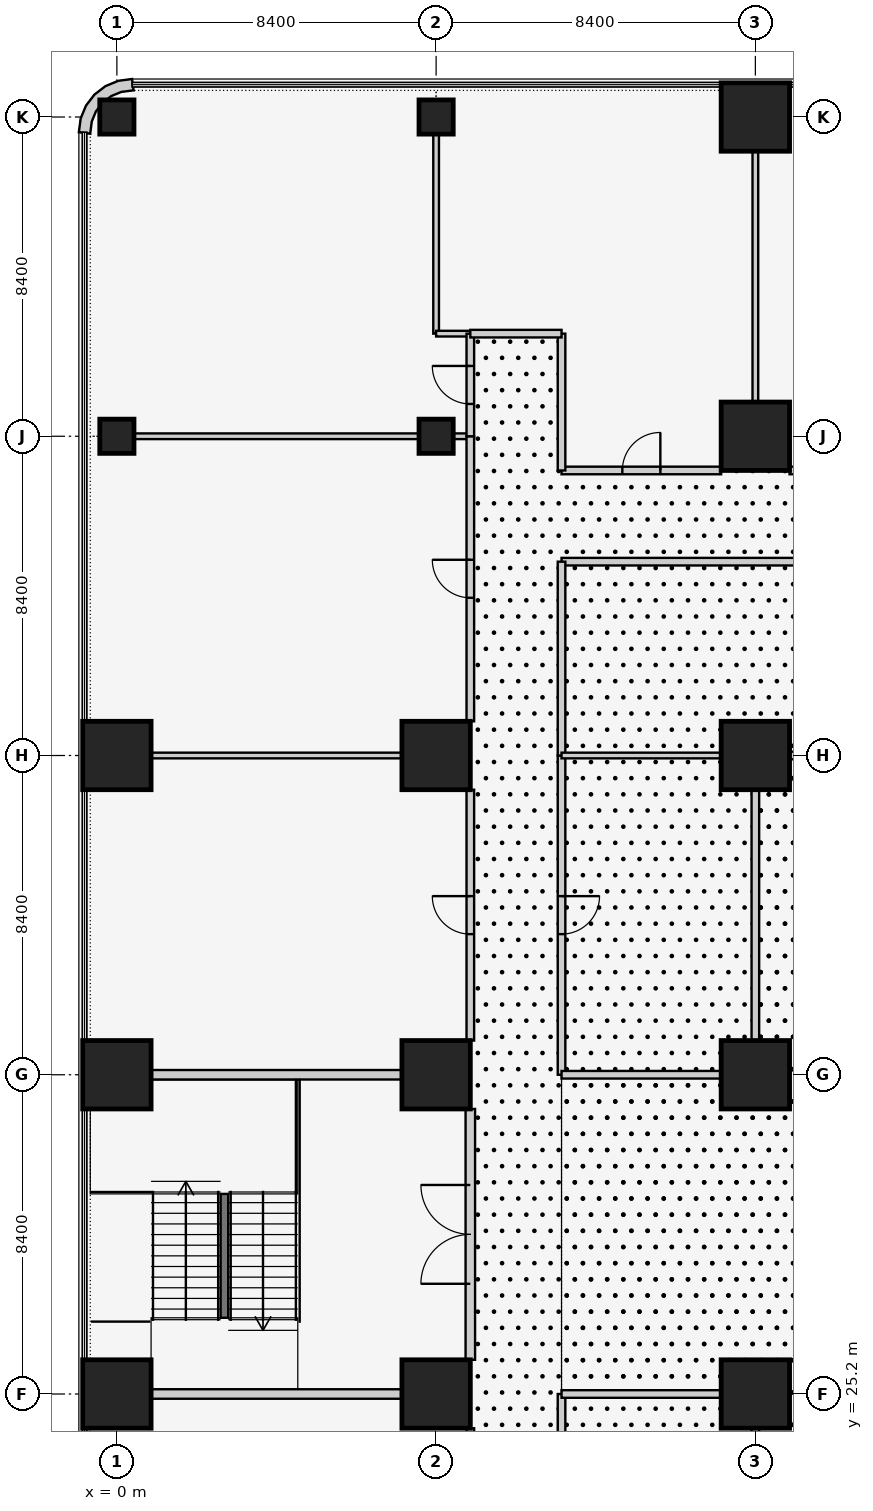
"""IFC4 building model, lengths in metres.
Left out: names, types, materials, properties, quantities, classifications, styles, units other than length and angle.
Written with IfcOpenShell. Run it as: python <this file> out.ifc"""

import sys

from ifc_helpers import new_model, si_unit, direction, frame, frame_2d, origin, origin_2d, place, context, subcontext, project, spatial, polyline, rectangle, outline, extrude, element, fill, save


model = new_model("IFC4")
c1 = context("Model", 3, precision=1e-05, world=origin(), true_north=direction((0.0, 1.0)))
c2 = subcontext(c1, "Body", "Model", "MODEL_VIEW")
j1 = project(units=[si_unit("LENGTHUNIT", "METRE"), si_unit("PLANEANGLEUNIT", "RADIAN")], contexts=[c1])
p1 = place(None, origin())
s1 = spatial("IfcSite", under=j1, at=p1, CompositionType="ELEMENT")
p2 = place(p1, origin())
s2 = spatial("IfcBuilding", under=s1, at=p2, CompositionType="ELEMENT")
p3 = place(p2, frame((0.0, 0.0, 6.0)))
s3 = spatial("IfcBuildingStorey", under=s2, at=p3, CompositionType="ELEMENT", Elevation=6.0)
for number, where, z_axis, x_axis in (
    (1, (0.0, 25.2, 0.0), (0.0, 0.0, 1.0), (1.0, 0.0, 0.0)),
    (2, (0.0, 33.6, 0.0), (0.0, 0.0, 1.0), (1.0, 0.0, 0.0)),
    (3, (0.0, 42.0, 0.0), (0.0, 0.0, 1.0), (1.0, 0.0, 0.0)),
):
    element("IfcColumn", number, at=place(p3, frame(where, z_axis=z_axis, x_axis=x_axis)), inside=s3, PredefinedType="COLUMN", context=c2, shape_type="SweptSolid", body=[
        extrude(rectangle(XDim=1.8, YDim=1.8, at=origin_2d()), origin(), (0.0, 0.0, 1.0), 4.5),
    ])
for number, where, z_axis, x_axis in (
    (4, (0.0, 50.4, 0.0), (0.0, 0.0, 1.0), (1.0, 0.0, 0.0)),
    (5, (0.0, 58.8, 0.0), (0.0, 0.0, 1.0), (1.0, 0.0, 0.0)),
):
    element("IfcColumn", number, at=place(p3, frame(where, z_axis=z_axis, x_axis=x_axis)), inside=s3, PredefinedType="COLUMN", context=c2, shape_type="SweptSolid", body=[
        extrude(rectangle(XDim=0.9, YDim=0.9, at=origin_2d()), origin(), (0.0, 0.0, 1.0), 4.5),
    ])
for number, where, z_axis, x_axis in (
    (6, (8.4, 25.2, 0.0), (0.0, 0.0, 1.0), (1.0, 0.0, 0.0)),
    (7, (8.4, 33.6, 0.0), (0.0, 0.0, 1.0), (1.0, 0.0, 0.0)),
    (8, (8.4, 42.0, 0.0), (0.0, 0.0, 1.0), (1.0, 0.0, 0.0)),
):
    element("IfcColumn", number, at=place(p3, frame(where, z_axis=z_axis, x_axis=x_axis)), inside=s3, PredefinedType="COLUMN", context=c2, shape_type="SweptSolid", body=[
        extrude(rectangle(XDim=1.8, YDim=1.8, at=origin_2d()), origin(), (0.0, 0.0, 1.0), 4.5),
    ])
for number, where, z_axis, x_axis in (
    (9, (8.4, 50.4, 0.0), (0.0, 0.0, 1.0), (1.0, 0.0, 0.0)),
    (10, (8.4, 58.8, 0.0), (0.0, 0.0, 1.0), (1.0, 0.0, 0.0)),
):
    element("IfcColumn", number, at=place(p3, frame(where, z_axis=z_axis, x_axis=x_axis)), inside=s3, PredefinedType="COLUMN", context=c2, shape_type="SweptSolid", body=[
        extrude(rectangle(XDim=0.9, YDim=0.9, at=origin_2d()), origin(), (0.0, 0.0, 1.0), 4.5),
    ])
for number, where, z_axis, x_axis in (
    (11, (16.8, 25.2, 0.0), (0.0, 0.0, 1.0), (1.0, 0.0, 0.0)),
    (12, (16.8, 33.6, 0.0), (0.0, 0.0, 1.0), (1.0, 0.0, 0.0)),
    (13, (16.8, 42.0, 0.0), (0.0, 0.0, 1.0), (1.0, 0.0, 0.0)),
    (14, (16.8, 50.4, 0.0), (0.0, 0.0, 1.0), (1.0, 0.0, 0.0)),
    (15, (16.8, 58.8, 0.0), (0.0, 0.0, 1.0), (1.0, 0.0, 0.0)),
):
    element("IfcColumn", number, at=place(p3, frame(where, z_axis=z_axis, x_axis=x_axis)), inside=s3, PredefinedType="COLUMN", context=c2, shape_type="SweptSolid", body=[
        extrude(rectangle(XDim=1.8, YDim=1.8, at=origin_2d()), origin(), (0.0, 0.0, 1.0), 4.5),
    ])
p4 = place(p3, frame((0.445, 59.648, 0.0), z_axis=(0.0, 0.0, 1.0), x_axis=(-0.707106781187, 0.707106781187, 0.0)))
e16 = element("IfcWall", 16, at=p4, inside=s3, PredefinedType="SOLIDWALL", context=c2, shape_type="SweptSolid", body=[
    extrude(outline(polyline([(0.139, 1.904), (-0.101, 1.72), (-0.087, 1.706), (0.1, 1.463), (0.209, 1.198), (0.247, 0.914), (0.209, 0.63), (0.1, 0.365), (-0.087, 0.122), (-0.101, 0.108), (0.139, -0.076), (0.362, 0.214), (0.502, 0.552), (0.549, 0.914), (0.502, 1.276), (0.362, 1.614), (0.139, 1.904)])), origin(), (0.0, 0.0, 1.0), 4.3),
])
for number, where, z_axis, x_axis in (
    (17, (7.5, 25.2, 0.0), (0.0, 0.0, 1.0), (-1.0, 0.0, 0.0)),
    (18, (0.9, 33.6, 0.0), (0.0, 0.0, 1.0), (1.0, 0.0, 0.0)),
):
    element("IfcWall", number, at=place(p3, frame(where, z_axis=z_axis, x_axis=x_axis)), inside=s3, PredefinedType="SOLIDWALL", context=c2, shape_type="SweptSolid", body=[
        extrude(rectangle(XDim=6.6, YDim=0.25, at=frame_2d((3.3, 0.0))), origin(), (0.0, 0.0, 1.0), 3.543),
    ])
p5 = place(p3, frame((9.3, 32.7, 0.0), z_axis=(0.0, 0.0, 1.0), x_axis=(0.0, -1.0, 0.0)))
e19 = element("IfcWall", 19, at=p5, inside=s3, PredefinedType="SOLIDWALL", context=c2, shape_type="SweptSolid", body=[
    extrude(rectangle(XDim=6.6, YDim=0.25, at=frame_2d((3.3, 0.0))), origin(), (0.0, 0.0, 1.0), 4.3),
])
p6 = place(p5, frame((2.0, 0.0, 0.0)))
e20 = element("IfcOpeningElement", 20, at=p6, cuts=e19, PredefinedType="OPENING", context=c2, shape_type="SweptSolid", body=[
    extrude(rectangle(XDim=2.6, YDim=2.4, at=frame_2d((1.3, 1.2))), frame((0.0, 0.135, 0.0), z_axis=(0.0, -1.0, 0.0), x_axis=(1.0, 0.0, 0.0)), (0.0, 0.0, 1.0), 0.27),
])
p7 = place(p3, frame((9.3, 24.3, 0.0), z_axis=(0.0, 0.0, 1.0), x_axis=(0.0, -1.0, 0.0)))
e21 = element("IfcWall", 21, at=p7, inside=s3, PredefinedType="PARTITIONING", context=c2, shape_type="SweptSolid", body=[
    extrude(rectangle(XDim=6.6, YDim=0.2, at=frame_2d((3.3, 0.0))), origin(), (0.0, 0.0, 1.0), 4.3),
])
p8 = place(p7, frame((2.8, 0.0, 0.0)))
e22 = element("IfcOpeningElement", 22, at=p8, cuts=e21, PredefinedType="OPENING", context=c2, shape_type="SweptSolid", body=[
    extrude(rectangle(XDim=1.0, YDim=2.1, at=frame_2d((0.5, 1.05))), frame((0.0, 0.11, 0.0), z_axis=(0.0, -1.0, 0.0), x_axis=(1.0, 0.0, 0.0)), (0.0, 0.0, 1.0), 0.22),
])
p9 = place(p3, frame((0.9, 42.0, 0.0), z_axis=(0.0, 0.0, 1.0), x_axis=(1.0, 0.0, 0.0)))
e23 = element("IfcWall", 23, at=p9, inside=s3, PredefinedType="PARTITIONING", context=c2, shape_type="SweptSolid", body=[
    extrude(rectangle(XDim=6.6, YDim=0.15, at=frame_2d((3.3, 0.0))), origin(), (0.0, 0.0, 1.0), 3.543),
])
p10 = place(p3, frame((9.3, 41.1, 0.0), z_axis=(0.0, 0.0, 1.0), x_axis=(0.0, -1.0, 0.0)))
e24 = element("IfcWall", 24, at=p10, inside=s3, PredefinedType="PARTITIONING", context=c2, shape_type="SweptSolid", body=[
    extrude(rectangle(XDim=6.6, YDim=0.2, at=frame_2d((3.3, 0.0))), origin(), (0.0, 0.0, 1.0), 4.3),
])
p11 = place(p10, frame((2.8, 0.0, 0.0)))
e25 = element("IfcOpeningElement", 25, at=p11, cuts=e24, PredefinedType="OPENING", context=c2, shape_type="SweptSolid", body=[
    extrude(rectangle(XDim=1.0, YDim=2.1, at=frame_2d((0.5, 1.05))), frame((0.0, 0.11, 0.0), z_axis=(0.0, -1.0, 0.0), x_axis=(1.0, 0.0, 0.0)), (0.0, 0.0, 1.0), 0.22),
])
p12 = place(p3, frame((0.45, 50.4, 0.0), z_axis=(0.0, 0.0, 1.0), x_axis=(1.0, 0.0, 0.0)))
e26 = element("IfcWall", 26, at=p12, inside=s3, PredefinedType="PARTITIONING", context=c2, shape_type="SweptSolid", body=[
    extrude(rectangle(XDim=7.5, YDim=0.15, at=frame_2d((3.75, 0.0))), origin(), (0.0, 0.0, 1.0), 3.543),
])
p13 = place(p3, frame((8.85, 50.4, 0.0), z_axis=(0.0, 0.0, 1.0), x_axis=(1.0, 0.0, 0.0)))
e27 = element("IfcWall", 27, at=p13, inside=s3, PredefinedType="PARTITIONING", context=c2, shape_type="SweptSolid", body=[
    extrude(rectangle(XDim=0.45, YDim=0.15, at=frame_2d((0.225, 0.0))), origin(), (0.0, 0.0, 1.0), 3.543),
])
p14 = place(p3, frame((9.3, 50.4, 0.0), z_axis=(0.0, 0.0, 1.0), x_axis=(0.0, -1.0, 0.0)))
e28 = element("IfcWall", 28, at=p14, inside=s3, PredefinedType="PARTITIONING", context=c2, shape_type="SweptSolid", body=[
    extrude(rectangle(XDim=7.5, YDim=0.2, at=frame_2d((3.75, 0.0))), origin(), (0.0, 0.0, 1.0), 4.3),
])
p15 = place(p14, frame((3.25, 0.0, 0.0)))
e29 = element("IfcOpeningElement", 29, at=p15, cuts=e28, PredefinedType="OPENING", context=c2, shape_type="SweptSolid", body=[
    extrude(rectangle(XDim=1.0, YDim=2.1, at=frame_2d((0.5, 1.05))), frame((0.0, 0.11, 0.0), z_axis=(0.0, -1.0, 0.0), x_axis=(1.0, 0.0, 0.0)), (0.0, 0.0, 1.0), 0.22),
])
p16 = place(p3, frame((16.8, 51.3, 0.0), z_axis=(0.0, 0.0, 1.0), x_axis=(0.0, 1.0, 0.0)))
e30 = element("IfcWall", 30, at=p16, inside=s3, PredefinedType="PARTITIONING", context=c2, shape_type="SweptSolid", body=[
    extrude(rectangle(XDim=6.6, YDim=0.15, at=frame_2d((3.3, 0.0))), origin(), (0.0, 0.0, 1.0), 3.543),
])
p17 = place(p3, frame((24.3, 49.5, 0.0), z_axis=(0.0, 0.0, 1.0), x_axis=(-1.0, 0.0, 0.0)))
e31 = element("IfcWall", 31, at=p17, inside=s3, PredefinedType="PARTITIONING", context=c2, shape_type="SweptSolid", body=[
    extrude(rectangle(XDim=6.6, YDim=0.2, at=frame_2d((3.3, 0.0))), origin(), (0.0, 0.0, 1.0), 4.3),
])
p18 = place(p17, frame((2.8, 0.0, 0.0)))
e32 = element("IfcOpeningElement", 32, at=p18, cuts=e31, PredefinedType="OPENING", context=c2, shape_type="SweptSolid", body=[
    extrude(rectangle(XDim=1.0, YDim=2.1, at=frame_2d((0.5, 1.05))), frame((0.0, 0.11, 0.0), z_axis=(0.0, -1.0, 0.0), x_axis=(1.0, 0.0, 0.0)), (0.0, 0.0, 1.0), 0.22),
])
p19 = place(p3, frame((8.4, 58.35, 0.0), z_axis=(0.0, 0.0, 1.0), x_axis=(0.0, -1.0, 0.0)))
e33 = element("IfcWall", 33, at=p19, inside=s3, PredefinedType="PARTITIONING", context=c2, shape_type="SweptSolid", body=[
    extrude(rectangle(XDim=5.25, YDim=0.15, at=frame_2d((2.625, 0.0))), origin(), (0.0, 0.0, 1.0), 3.543),
])
p20 = place(p3, frame((8.4, 53.1, 0.0), z_axis=(0.0, 0.0, 1.0), x_axis=(1.0, 0.0, 0.0)))
e34 = element("IfcWall", 34, at=p20, inside=s3, PredefinedType="PARTITIONING", context=c2, shape_type="SweptSolid", body=[
    extrude(rectangle(XDim=0.9, YDim=0.15, at=frame_2d((0.45, 0.0))), origin(), (0.0, 0.0, 1.0), 4.3),
])
p21 = place(p3, frame((9.3, 53.1, 0.0), z_axis=(0.0, 0.0, 1.0), x_axis=(0.0, -1.0, 0.0)))
e35 = element("IfcWall", 35, at=p21, inside=s3, PredefinedType="PARTITIONING", context=c2, shape_type="SweptSolid", body=[
    extrude(rectangle(XDim=2.7, YDim=0.2, at=frame_2d((1.35, 0.0))), origin(), (0.0, 0.0, 1.0), 4.3),
])
p22 = place(p21, frame((0.85, 0.0, 0.0)))
e36 = element("IfcOpeningElement", 36, at=p22, cuts=e35, PredefinedType="OPENING", context=c2, shape_type="SweptSolid", body=[
    extrude(rectangle(XDim=1.0, YDim=2.1, at=frame_2d((0.5, 1.05))), frame((0.0, 0.11, 0.0), z_axis=(0.0, -1.0, 0.0), x_axis=(1.0, 0.0, 0.0)), (0.0, 0.0, 1.0), 0.22),
])
p23 = place(p3, frame((15.9, 49.5, 0.0), z_axis=(0.0, 0.0, 1.0), x_axis=(-1.0, 0.0, 0.0)))
e37 = element("IfcWall", 37, at=p23, inside=s3, PredefinedType="PARTITIONING", context=c2, shape_type="SweptSolid", body=[
    extrude(rectangle(XDim=4.2, YDim=0.2, at=frame_2d((2.1, 0.0))), origin(), (0.0, 0.0, 1.0), 4.3),
])
p24 = place(p23, frame((1.6, 0.0, 0.0)))
e38 = element("IfcOpeningElement", 38, at=p24, cuts=e37, PredefinedType="OPENING", context=c2, shape_type="SweptSolid", body=[
    extrude(rectangle(XDim=1.0, YDim=2.1, at=frame_2d((0.5, 1.05))), frame((0.0, 0.11, 0.0), z_axis=(0.0, -1.0, 0.0), x_axis=(1.0, 0.0, 0.0)), (0.0, 0.0, 1.0), 0.22),
])
p25 = place(p3, frame((11.7, 49.5, 0.0), z_axis=(0.0, 0.0, 1.0), x_axis=(0.0, 1.0, 0.0)))
e39 = element("IfcWall", 39, at=p25, inside=s3, PredefinedType="PARTITIONING", context=c2, shape_type="SweptSolid", body=[
    extrude(rectangle(XDim=3.6, YDim=0.2, at=frame_2d((1.8, 0.0))), origin(), (0.0, 0.0, 1.0), 4.3),
])
p26 = place(p3, frame((11.7, 53.1, 0.0), z_axis=(0.0, 0.0, 1.0), x_axis=(-1.0, 0.0, 0.0)))
e40 = element("IfcWall", 40, at=p26, inside=s3, PredefinedType="PARTITIONING", context=c2, shape_type="SweptSolid", body=[
    extrude(rectangle(XDim=2.4, YDim=0.2, at=frame_2d((1.2, 0.0))), origin(), (0.0, 0.0, 1.0), 4.3),
])
p27 = place(p3, frame((11.7, 25.2, 0.0), z_axis=(0.0, 0.0, 1.0), x_axis=(0.0, -1.0, 0.0)))
e41 = element("IfcWall", 41, at=p27, inside=s3, PredefinedType="PARTITIONING", context=c2, shape_type="SweptSolid", body=[
    extrude(rectangle(XDim=8.4, YDim=0.2, at=frame_2d((4.2, 0.0))), origin(), (0.0, 0.0, 1.0), 4.3),
])
p28 = place(p27, frame((3.7, 0.0, 0.0)))
e42 = element("IfcOpeningElement", 42, at=p28, cuts=e41, PredefinedType="OPENING", context=c2, shape_type="SweptSolid", body=[
    extrude(rectangle(XDim=1.0, YDim=2.1, at=frame_2d((0.5, 1.05))), frame((0.0, 0.11, 0.0), z_axis=(0.0, -1.0, 0.0), x_axis=(1.0, 0.0, 0.0)), (0.0, 0.0, 1.0), 0.22),
])
p29 = place(p3, frame((11.7, 42.0, 0.0), z_axis=(0.0, 0.0, 1.0), x_axis=(0.0, -1.0, 0.0)))
e43 = element("IfcWall", 43, at=p29, inside=s3, PredefinedType="PARTITIONING", context=c2, shape_type="SweptSolid", body=[
    extrude(rectangle(XDim=8.4, YDim=0.2, at=frame_2d((4.2, 0.0))), origin(), (0.0, 0.0, 1.0), 4.3),
])
p30 = place(p29, frame((3.7, 0.0, 0.0)))
e44 = element("IfcOpeningElement", 44, at=p30, cuts=e43, PredefinedType="OPENING", context=c2, shape_type="SweptSolid", body=[
    extrude(rectangle(XDim=1.0, YDim=2.1, at=frame_2d((0.5, 1.05))), frame((0.0, 0.11, 0.0), z_axis=(0.0, -1.0, 0.0), x_axis=(1.0, 0.0, 0.0)), (0.0, 0.0, 1.0), 0.22),
])
p31 = place(p3, frame((25.2, 47.1, 0.0), z_axis=(0.0, 0.0, 1.0), x_axis=(-1.0, 0.0, 0.0)))
e45 = element("IfcWall", 45, at=p31, inside=s3, PredefinedType="PARTITIONING", context=c2, shape_type="SweptSolid", body=[
    extrude(rectangle(XDim=13.5, YDim=0.2, at=frame_2d((6.75, 0.0))), origin(), (0.0, 0.0, 1.0), 4.3),
])
p32 = place(p31, frame((6.25, 0.0, 0.0)))
e46 = element("IfcOpeningElement", 46, at=p32, cuts=e45, PredefinedType="OPENING", context=c2, shape_type="SweptSolid", body=[
    extrude(rectangle(XDim=1.0, YDim=2.1, at=frame_2d((0.5, 1.05))), frame((0.0, 0.11, 0.0), z_axis=(0.0, -1.0, 0.0), x_axis=(1.0, 0.0, 0.0)), (0.0, 0.0, 1.0), 0.22),
])
p33 = place(p3, frame((11.7, 47.1, 0.0), z_axis=(0.0, 0.0, 1.0), x_axis=(0.0, -1.0, 0.0)))
e47 = element("IfcWall", 47, at=p33, inside=s3, PredefinedType="PARTITIONING", context=c2, shape_type="SweptSolid", body=[
    extrude(rectangle(XDim=5.1, YDim=0.2, at=frame_2d((2.55, 0.0))), origin(), (0.0, 0.0, 1.0), 4.3),
])
p34 = place(p3, frame((15.9, 25.2, 0.0), z_axis=(0.0, 0.0, 1.0), x_axis=(-1.0, 0.0, 0.0)))
e48 = element("IfcWall", 48, at=p34, inside=s3, PredefinedType="PARTITIONING", context=c2, shape_type="SweptSolid", body=[
    extrude(rectangle(XDim=4.2, YDim=0.2, at=frame_2d((2.1, 0.0))), origin(), (0.0, 0.0, 1.0), 3.543),
])
p35 = place(p3, frame((16.8, 17.7, 0.0), z_axis=(0.0, 0.0, 1.0), x_axis=(0.0, 1.0, 0.0)))
e49 = element("IfcWall", 49, at=p35, inside=s3, PredefinedType="PARTITIONING", context=c2, shape_type="SweptSolid", body=[
    extrude(rectangle(XDim=6.6, YDim=0.2, at=frame_2d((3.3, 0.0))), origin(), (0.0, 0.0, 1.0), 3.543),
])
p36 = place(p3, frame((11.7, 33.6, 0.0), z_axis=(0.0, 0.0, 1.0), x_axis=(1.0, 0.0, 0.0)))
e50 = element("IfcWall", 50, at=p36, inside=s3, PredefinedType="PARTITIONING", context=c2, shape_type="SweptSolid", body=[
    extrude(rectangle(XDim=4.2, YDim=0.2, at=frame_2d((2.1, 0.0))), origin(), (0.0, 0.0, 1.0), 3.543),
])
p37 = place(p3, frame((16.8, 34.5, 0.0), z_axis=(0.0, 0.0, 1.0), x_axis=(0.0, 1.0, 0.0)))
e51 = element("IfcWall", 51, at=p37, inside=s3, PredefinedType="PARTITIONING", context=c2, shape_type="SweptSolid", body=[
    extrude(rectangle(XDim=6.6, YDim=0.2, at=frame_2d((3.3, 0.0))), origin(), (0.0, 0.0, 1.0), 3.543),
])
p38 = place(p3, frame((17.7, 42.0, 0.0), z_axis=(0.0, 0.0, 1.0), x_axis=(1.0, 0.0, 0.0)))
e52 = element("IfcWall", 52, at=p38, inside=s3, PredefinedType="PARTITIONING", context=c2, shape_type="SweptSolid", body=[
    extrude(rectangle(XDim=2.8, YDim=0.2, at=frame_2d((1.4, 0.0))), origin(), (0.0, 0.0, 1.0), 3.543),
])
p39 = place(p3, frame((11.7, 42.0, 0.0), z_axis=(0.0, 0.0, 1.0), x_axis=(1.0, 0.0, 0.0)))
e53 = element("IfcWall", 53, at=p39, inside=s3, PredefinedType="PARTITIONING", context=c2, shape_type="SweptSolid", body=[
    extrude(rectangle(XDim=4.2, YDim=0.15, at=frame_2d((2.1, 0.0))), origin(), (0.0, 0.0, 1.0), 3.543),
])
p40 = place(p3, frame((2.83, 27.205, 0.0), z_axis=(0.0, 0.0, 1.0), x_axis=(0.0, 1.0, 0.0)))
e54 = element("IfcWall", 54, at=p40, inside=s3, PredefinedType="SOLIDWALL", context=c2, shape_type="SweptSolid", body=[
    extrude(rectangle(XDim=3.26, YDim=0.2, at=frame_2d((1.63, 0.0))), origin(), (0.0, 0.0, 1.0), 4.5),
])
p41 = place(p6, frame((2.6, 0.0, 0.0), z_axis=(0.0, 0.0, 1.0), x_axis=(-1.0, 0.0, 0.0)))
e55 = element("IfcDoor", 55, at=p41, inside=s3, OperationType="DOUBLE_DOOR_SINGLE_SWING", PredefinedType="DOOR", context=c2, shape_type="SweptSolid", body=[
    extrude(rectangle(XDim=2.6, YDim=2.4, at=frame_2d((1.3, 1.2))), frame((0.0, 0.025, 0.0), z_axis=(0.0, -1.0, 0.0), x_axis=(1.0, 0.0, 0.0)), (0.0, 0.0, 1.0), 0.05),
])
fill(e20, e55)
p42 = place(p11, frame((1.0, 0.0, 0.0), z_axis=(0.0, 0.0, 1.0), x_axis=(-1.0, 0.0, 0.0)))
e56 = element("IfcDoor", 56, at=p42, inside=s3, OperationType="SINGLE_SWING_RIGHT", PredefinedType="DOOR", context=c2, shape_type="SweptSolid", body=[
    extrude(rectangle(XDim=1.0, YDim=2.1, at=frame_2d((0.5, 1.05))), frame((0.0, 0.025, 0.0), z_axis=(0.0, -1.0, 0.0), x_axis=(1.0, 0.0, 0.0)), (0.0, 0.0, 1.0), 0.05),
])
fill(e25, e56)
p43 = place(p15, frame((1.0, 0.0, 0.0), z_axis=(0.0, 0.0, 1.0), x_axis=(-1.0, 0.0, 0.0)))
e57 = element("IfcDoor", 57, at=p43, inside=s3, OperationType="SINGLE_SWING_RIGHT", PredefinedType="DOOR", context=c2, shape_type="SweptSolid", body=[
    extrude(rectangle(XDim=1.0, YDim=2.1, at=frame_2d((0.5, 1.05))), frame((0.0, 0.025, 0.0), z_axis=(0.0, -1.0, 0.0), x_axis=(1.0, 0.0, 0.0)), (0.0, 0.0, 1.0), 0.05),
])
fill(e29, e57)
p44 = place(p22, frame((1.0, 0.0, 0.0), z_axis=(0.0, 0.0, 1.0), x_axis=(-1.0, 0.0, 0.0)))
e58 = element("IfcDoor", 58, at=p44, inside=s3, OperationType="SINGLE_SWING_RIGHT", PredefinedType="DOOR", context=c2, shape_type="SweptSolid", body=[
    extrude(rectangle(XDim=1.0, YDim=2.1, at=frame_2d((0.5, 1.05))), frame((0.0, 0.025, 0.0), z_axis=(0.0, -1.0, 0.0), x_axis=(1.0, 0.0, 0.0)), (0.0, 0.0, 1.0), 0.05),
])
fill(e36, e58)
p45 = place(p24, frame((1.0, 0.0, 0.0), z_axis=(0.0, 0.0, 1.0), x_axis=(-1.0, 0.0, 0.0)))
e59 = element("IfcDoor", 59, at=p45, inside=s3, OperationType="SINGLE_SWING_RIGHT", PredefinedType="DOOR", context=c2, shape_type="SweptSolid", body=[
    extrude(rectangle(XDim=1.0, YDim=2.1, at=frame_2d((0.5, 1.05))), frame((0.0, 0.025, 0.0), z_axis=(0.0, -1.0, 0.0), x_axis=(1.0, 0.0, 0.0)), (0.0, 0.0, 1.0), 0.05),
])
fill(e38, e59)
p46 = place(p30, origin())
e60 = element("IfcDoor", 60, at=p46, inside=s3, OperationType="SINGLE_SWING_LEFT", PredefinedType="DOOR", context=c2, shape_type="SweptSolid", body=[
    extrude(rectangle(XDim=1.0, YDim=2.1, at=frame_2d((0.5, 1.05))), frame((0.0, 0.025, 0.0), z_axis=(0.0, -1.0, 0.0), x_axis=(1.0, 0.0, 0.0)), (0.0, 0.0, 1.0), 0.05),
])
fill(e44, e60)
save(model, sys.argv[1])
